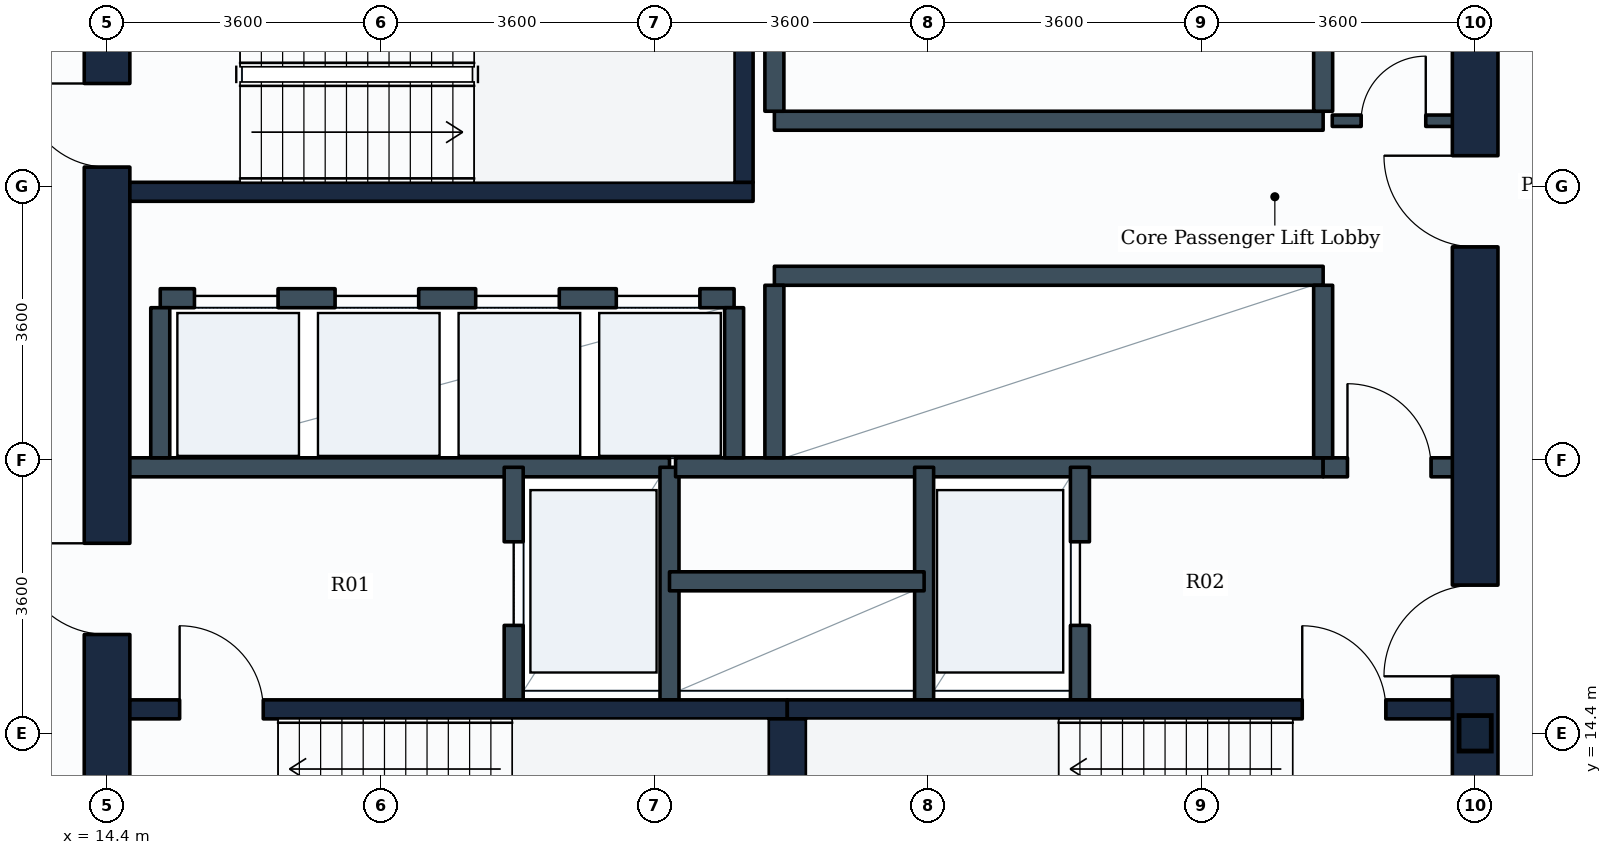
"""IFC4 building model, lengths in metres.
Left out: names, types, materials, properties, quantities, classifications, styles, units other than length and angle.
Written with IfcOpenShell. Run it as: python <this file> out.ifc"""

import sys

from ifc_helpers import new_model, si_unit, direction, frame, frame_2d, origin, origin_2d, place, context, subcontext, project, spatial, rectangle, i_section, extrude, element, fill, save


model = new_model("IFC4")
c1 = context("Model", 3, precision=1e-05, world=origin(), true_north=direction((0.0, 1.0)))
c2 = subcontext(c1, "Body", "Model", "MODEL_VIEW")
j1 = project(units=[si_unit("LENGTHUNIT", "METRE"), si_unit("PLANEANGLEUNIT", "RADIAN")], contexts=[c1])
p1 = place(None, origin())
s1 = spatial("IfcSite", under=j1, at=p1, CompositionType="ELEMENT")
p2 = place(p1, origin())
s2 = spatial("IfcBuilding", under=s1, at=p2, CompositionType="ELEMENT")
p3 = place(p2, frame((0.0, 0.0, 59.1)))
s3 = spatial("IfcBuildingStorey", under=s2, at=p3, CompositionType="ELEMENT", Elevation=59.1)
p4 = place(p3, frame((32.4, 14.4, 0.0), z_axis=(0.0, 0.0, 1.0), x_axis=(1.0, 0.0, 0.0)))
e1 = element("IfcColumn", 1, at=p4, inside=s3, PredefinedType="COLUMN", context=c2, shape_type="SweptSolid", body=[
    extrude(i_section(OverallWidth=0.424, OverallDepth=0.467, WebThickness=0.033, FlangeThickness=0.053, FilletRadius=0.015, at=origin_2d()), origin(), (0.0, 0.0, 1.0), 3.9),
])
p5 = place(p3, frame((14.4, 10.8, 0.0), z_axis=(0.0, 0.0, 1.0), x_axis=(0.0, 1.0, 0.0)))
e2 = element("IfcWall", 2, at=p5, inside=s3, PredefinedType="SHEAR", context=c2, shape_type="SweptSolid", body=[
    extrude(rectangle(XDim=14.4, YDim=0.6, at=frame_2d((7.2, 0.0))), origin(), (0.0, 0.0, 1.0), 3.65),
])
p6 = place(p5, frame((11.05, 0.0, 0.0)))
e3 = element("IfcOpeningElement", 3, at=p6, cuts=e2, PredefinedType="OPENING", context=c2, shape_type="SweptSolid", body=[
    extrude(rectangle(XDim=1.1, YDim=2.1, at=frame_2d((0.55, 1.05))), frame((0.0, 0.31, 0.0), z_axis=(0.0, -1.0, 0.0), x_axis=(1.0, 0.0, 0.0)), (0.0, 0.0, 1.0), 0.62),
])
p7 = place(p5, frame((4.9, 0.0, 0.0)))
e4 = element("IfcOpeningElement", 4, at=p7, cuts=e2, PredefinedType="OPENING", context=c2, shape_type="SweptSolid", body=[
    extrude(rectangle(XDim=1.2, YDim=2.1, at=frame_2d((0.6, 1.05))), frame((0.0, 0.31, 0.0), z_axis=(0.0, -1.0, 0.0), x_axis=(1.0, 0.0, 0.0)), (0.0, 0.0, 1.0), 0.62),
])
p8 = place(p3, frame((32.4, 10.8, 0.0), z_axis=(0.0, 0.0, 1.0), x_axis=(0.0, 1.0, 0.0)))
e5 = element("IfcWall", 5, at=p8, inside=s3, PredefinedType="SHEAR", context=c2, shape_type="SweptSolid", body=[
    extrude(rectangle(XDim=14.4, YDim=0.6, at=frame_2d((7.2, 0.0))), origin(), (0.0, 0.0, 1.0), 3.65),
])
p9 = place(p8, frame((4.35, 0.0, 0.0)))
e6 = element("IfcOpeningElement", 6, at=p9, cuts=e5, PredefinedType="OPENING", context=c2, shape_type="SweptSolid", body=[
    extrude(rectangle(XDim=1.2, YDim=2.1, at=frame_2d((0.6, 1.05))), frame((0.0, 0.31, 0.0), z_axis=(0.0, -1.0, 0.0), x_axis=(1.0, 0.0, 0.0)), (0.0, 0.0, 1.0), 0.62),
])
p10 = place(p8, frame((10.0, 0.0, 0.0)))
e7 = element("IfcOpeningElement", 7, at=p10, cuts=e5, PredefinedType="OPENING", context=c2, shape_type="SweptSolid", body=[
    extrude(rectangle(XDim=1.2, YDim=2.1, at=frame_2d((0.6, 1.05))), frame((0.0, 0.31, 0.0), z_axis=(0.0, -1.0, 0.0), x_axis=(1.0, 0.0, 0.0)), (0.0, 0.0, 1.0), 0.62),
])
p11 = place(p3, frame((14.7, 14.715, 0.0), z_axis=(0.0, 0.0, 1.0), x_axis=(1.0, 0.0, 0.0)))
e8 = element("IfcWall", 8, at=p11, inside=s3, PredefinedType="SHEAR", context=c2, shape_type="SweptSolid", body=[
    extrude(rectangle(XDim=8.65, YDim=0.25, at=frame_2d((4.325, 0.0))), origin(), (0.0, 0.0, 1.0), 3.65),
])
p12 = place(p11, frame((0.655, 0.0, 0.0)))
e9 = element("IfcOpeningElement", 9, at=p12, cuts=e8, PredefinedType="OPENING", context=c2, shape_type="SweptSolid", body=[
    extrude(rectangle(XDim=1.1, YDim=2.1, at=frame_2d((0.55, 1.05))), frame((0.0, 0.135, 0.0), z_axis=(0.0, -1.0, 0.0), x_axis=(1.0, 0.0, 0.0)), (0.0, 0.0, 1.0), 0.27),
])
p13 = place(p3, frame((23.35, 14.715, 0.0), z_axis=(0.0, 0.0, 1.0), x_axis=(1.0, 0.0, 0.0)))
e10 = element("IfcWall", 10, at=p13, inside=s3, PredefinedType="SHEAR", context=c2, shape_type="SweptSolid", body=[
    extrude(rectangle(XDim=8.75, YDim=0.25, at=frame_2d((4.375, 0.0))), origin(), (0.0, 0.0, 1.0), 3.65),
])
p14 = place(p13, frame((6.775, 0.0, 0.0)))
e11 = element("IfcOpeningElement", 11, at=p14, cuts=e10, PredefinedType="OPENING", context=c2, shape_type="SweptSolid", body=[
    extrude(rectangle(XDim=1.1, YDim=2.1, at=frame_2d((0.55, 1.05))), frame((0.0, 0.135, 0.0), z_axis=(0.0, -1.0, 0.0), x_axis=(1.0, 0.0, 0.0)), (0.0, 0.0, 1.0), 0.27),
])
p15 = place(p3, frame((23.35, 11.75, 0.0), z_axis=(0.0, 0.0, 1.0), x_axis=(0.0, 1.0, 0.0)))
e12 = element("IfcWall", 12, at=p15, inside=s3, PredefinedType="SHEAR", context=c2, shape_type="SweptSolid", body=[
    extrude(rectangle(XDim=2.84, YDim=0.5, at=frame_2d((1.42, 0.0))), origin(), (0.0, 0.0, 1.0), 3.65),
])
p16 = place(p3, frame((14.7, 21.525, 0.0), z_axis=(0.0, 0.0, 1.0), x_axis=(1.0, 0.0, 0.0)))
e13 = element("IfcWall", 13, at=p16, inside=s3, PredefinedType="SHEAR", context=c2, shape_type="SweptSolid", body=[
    extrude(rectangle(XDim=8.2, YDim=0.25, at=frame_2d((4.1, 0.0))), origin(), (0.0, 0.0, 1.0), 3.65),
])
p17 = place(p3, frame((22.775, 21.65, 0.0), z_axis=(0.0, 0.0, 1.0), x_axis=(0.0, 1.0, 0.0)))
e14 = element("IfcWall", 14, at=p17, inside=s3, PredefinedType="SHEAR", context=c2, shape_type="SweptSolid", body=[
    extrude(rectangle(XDim=2.84, YDim=0.25, at=frame_2d((1.42, 0.0))), origin(), (0.0, 0.0, 1.0), 3.65),
])
p18 = place(p3, frame((14.65, 17.9, 0.0), z_axis=(0.0, 0.0, 1.0), x_axis=(1.0, 0.0, 0.0)))
e15 = element("IfcWall", 15, at=p18, inside=s3, PredefinedType="PARTITIONING", context=c2, shape_type="SweptSolid", body=[
    extrude(rectangle(XDim=7.15, YDim=0.25, at=frame_2d((3.575, 0.0))), origin(), (0.0, 0.0, 1.0), 3.635),
])
p19 = place(p3, frame((19.75, 14.84, 0.0), z_axis=(0.0, 0.0, 1.0), x_axis=(0.0, 1.0, 0.0)))
e16 = element("IfcWall", 16, at=p19, inside=s3, PredefinedType="PARTITIONING", context=c2, shape_type="SweptSolid", body=[
    extrude(rectangle(XDim=3.06, YDim=0.25, at=frame_2d((1.53, 0.0))), origin(), (0.0, 0.0, 1.0), 3.635),
])
p20 = place(p19, frame((0.98, 0.0, 0.0)))
e17 = element("IfcOpeningElement", 17, at=p20, cuts=e16, PredefinedType="OPENING", context=c2, shape_type="SweptSolid", body=[
    extrude(rectangle(XDim=1.1, YDim=2.1, at=frame_2d((0.55, 1.05))), frame((0.0, 0.135, 0.0), z_axis=(0.0, -1.0, 0.0), x_axis=(1.0, 0.0, 0.0)), (0.0, 0.0, 1.0), 0.27),
])
p21 = place(p3, frame((21.8, 14.84, 0.0), z_axis=(0.0, 0.0, 1.0), x_axis=(0.0, 1.0, 0.0)))
e18 = element("IfcWall", 18, at=p21, inside=s3, PredefinedType="PARTITIONING", context=c2, shape_type="SweptSolid", body=[
    extrude(rectangle(XDim=3.06, YDim=0.25, at=frame_2d((1.53, 0.0))), origin(), (0.0, 0.0, 1.0), 3.635),
])
p22 = place(p3, frame((21.88, 17.9, 0.0), z_axis=(0.0, 0.0, 1.0), x_axis=(1.0, 0.0, 0.0)))
e19 = element("IfcWall", 19, at=p22, inside=s3, PredefinedType="PARTITIONING", context=c2, shape_type="SweptSolid", body=[
    extrude(rectangle(XDim=8.52, YDim=0.25, at=frame_2d((4.26, 0.0))), origin(), (0.0, 0.0, 1.0), 3.635),
])
p23 = place(p3, frame((30.4, 17.9, 0.0), z_axis=(0.0, 0.0, 1.0), x_axis=(1.0, 0.0, 0.0)))
e20 = element("IfcWall", 20, at=p23, inside=s3, PredefinedType="PARTITIONING", context=c2, shape_type="SweptSolid", body=[
    extrude(rectangle(XDim=1.75, YDim=0.25, at=frame_2d((0.875, 0.0))), origin(), (0.0, 0.0, 1.0), 3.635),
])
p24 = place(p23, frame((0.32, 0.0, 0.0)))
e21 = element("IfcOpeningElement", 21, at=p24, cuts=e20, PredefinedType="OPENING", context=c2, shape_type="SweptSolid", body=[
    extrude(rectangle(XDim=1.1, YDim=2.1, at=frame_2d((0.55, 1.05))), frame((0.0, 0.135, 0.0), z_axis=(0.0, -1.0, 0.0), x_axis=(1.0, 0.0, 0.0)), (0.0, 0.0, 1.0), 0.27),
])
p25 = place(p3, frame((25.15, 14.84, 0.0), z_axis=(0.0, 0.0, 1.0), x_axis=(0.0, 1.0, 0.0)))
e22 = element("IfcWall", 22, at=p25, inside=s3, PredefinedType="PARTITIONING", context=c2, shape_type="SweptSolid", body=[
    extrude(rectangle(XDim=3.06, YDim=0.25, at=frame_2d((1.53, 0.0))), origin(), (0.0, 0.0, 1.0), 3.635),
])
p26 = place(p3, frame((27.2, 14.84, 0.0), z_axis=(0.0, 0.0, 1.0), x_axis=(0.0, 1.0, 0.0)))
e23 = element("IfcWall", 23, at=p26, inside=s3, PredefinedType="PARTITIONING", context=c2, shape_type="SweptSolid", body=[
    extrude(rectangle(XDim=3.06, YDim=0.25, at=frame_2d((1.53, 0.0))), origin(), (0.0, 0.0, 1.0), 3.635),
])
p27 = place(p26, frame((0.98, 0.0, 0.0)))
e24 = element("IfcOpeningElement", 24, at=p27, cuts=e23, PredefinedType="OPENING", context=c2, shape_type="SweptSolid", body=[
    extrude(rectangle(XDim=1.1, YDim=2.1, at=frame_2d((0.55, 1.05))), frame((0.0, 0.135, 0.0), z_axis=(0.0, -1.0, 0.0), x_axis=(1.0, 0.0, 0.0)), (0.0, 0.0, 1.0), 0.27),
])
p28 = place(p3, frame((21.8, 16.4, 0.0), z_axis=(0.0, 0.0, 1.0), x_axis=(1.0, 0.0, 0.0)))
e25 = element("IfcWall", 25, at=p28, inside=s3, PredefinedType="PARTITIONING", context=c2, shape_type="SweptSolid", body=[
    extrude(rectangle(XDim=3.35, YDim=0.25, at=frame_2d((1.675, 0.0))), origin(), (0.0, 0.0, 1.0), 3.635),
])
p29 = place(p3, frame((15.1, 20.125, 0.0), z_axis=(0.0, 0.0, 1.0), x_axis=(1.0, 0.0, 0.0)))
e26 = element("IfcWall", 26, at=p29, inside=s3, PredefinedType="PARTITIONING", context=c2, shape_type="SweptSolid", body=[
    extrude(rectangle(XDim=7.55, YDim=0.25, at=frame_2d((3.775, 0.0))), origin(), (0.0, 0.0, 1.0), 3.635),
])
p30 = place(p29, frame((0.45, 0.0, 0.0)))
e27 = element("IfcOpeningElement", 27, at=p30, cuts=e26, PredefinedType="OPENING", context=c2, shape_type="SweptSolid", body=[
    extrude(rectangle(XDim=1.1, YDim=2.1, at=frame_2d((0.55, 1.05))), frame((0.0, 0.135, 0.0), z_axis=(0.0, -1.0, 0.0), x_axis=(1.0, 0.0, 0.0)), (0.0, 0.0, 1.0), 0.27),
])
p31 = place(p29, frame((2.3, 0.0, 0.0)))
e28 = element("IfcOpeningElement", 28, at=p31, cuts=e26, PredefinedType="OPENING", context=c2, shape_type="SweptSolid", body=[
    extrude(rectangle(XDim=1.1, YDim=2.1, at=frame_2d((0.55, 1.05))), frame((0.0, 0.135, 0.0), z_axis=(0.0, -1.0, 0.0), x_axis=(1.0, 0.0, 0.0)), (0.0, 0.0, 1.0), 0.27),
])
p32 = place(p29, frame((4.15, 0.0, 0.0)))
e29 = element("IfcOpeningElement", 29, at=p32, cuts=e26, PredefinedType="OPENING", context=c2, shape_type="SweptSolid", body=[
    extrude(rectangle(XDim=1.1, YDim=2.1, at=frame_2d((0.55, 1.05))), frame((0.0, 0.135, 0.0), z_axis=(0.0, -1.0, 0.0), x_axis=(1.0, 0.0, 0.0)), (0.0, 0.0, 1.0), 0.27),
])
p33 = place(p29, frame((6.0, 0.0, 0.0)))
e30 = element("IfcOpeningElement", 30, at=p33, cuts=e26, PredefinedType="OPENING", context=c2, shape_type="SweptSolid", body=[
    extrude(rectangle(XDim=1.1, YDim=2.1, at=frame_2d((0.55, 1.05))), frame((0.0, 0.135, 0.0), z_axis=(0.0, -1.0, 0.0), x_axis=(1.0, 0.0, 0.0)), (0.0, 0.0, 1.0), 0.27),
])
for number, where, z_axis, x_axis in (
    (31, (15.1, 18.025, 0.0), (0.0, 0.0, 1.0), (0.0, 1.0, 0.0)),
    (32, (22.65, 18.025, 0.0), (0.0, 0.0, 1.0), (0.0, 1.0, 0.0)),
):
    element("IfcWall", number, at=place(p3, frame(where, z_axis=z_axis, x_axis=x_axis)), inside=s3, PredefinedType="PARTITIONING", context=c2, shape_type="SweptSolid", body=[
        extrude(rectangle(XDim=1.975, YDim=0.25, at=frame_2d((0.988, 0.0))), origin(), (0.0, 0.0, 1.0), 3.635),
    ])
p34 = place(p3, frame((23.18, 20.42, 0.0), z_axis=(0.0, 0.0, 1.0), x_axis=(1.0, 0.0, 0.0)))
e33 = element("IfcWall", 33, at=p34, inside=s3, PredefinedType="PARTITIONING", context=c2, shape_type="SweptSolid", body=[
    extrude(rectangle(XDim=7.22, YDim=0.25, at=frame_2d((3.61, 0.0))), origin(), (0.0, 0.0, 1.0), 3.635),
])
for number, where, z_axis, x_axis in (
    (34, (23.18, 18.025, 0.0), (0.0, 0.0, 1.0), (0.0, 1.0, 0.0)),
    (35, (30.4, 18.025, 0.0), (0.0, 0.0, 1.0), (0.0, 1.0, 0.0)),
):
    element("IfcWall", number, at=place(p3, frame(where, z_axis=z_axis, x_axis=x_axis)), inside=s3, PredefinedType="PARTITIONING", context=c2, shape_type="SweptSolid", body=[
        extrude(rectangle(XDim=2.27, YDim=0.25, at=frame_2d((1.135, 0.0))), origin(), (0.0, 0.0, 1.0), 3.635),
    ])
p35 = place(p3, frame((23.18, 22.46, 0.0), z_axis=(0.0, 0.0, 1.0), x_axis=(1.0, 0.0, 0.0)))
e36 = element("IfcWall", 36, at=p35, inside=s3, PredefinedType="PARTITIONING", context=c2, shape_type="SweptSolid", body=[
    extrude(rectangle(XDim=7.22, YDim=0.25, at=frame_2d((3.61, 0.0))), origin(), (0.0, 0.0, 1.0), 3.635),
])
for number, where, z_axis, x_axis in (
    (37, (23.18, 22.585, 0.0), (0.0, 0.0, 1.0), (0.0, 1.0, 0.0)),
    (38, (30.4, 22.585, 0.0), (0.0, 0.0, 1.0), (0.0, 1.0, 0.0)),
):
    element("IfcWall", number, at=place(p3, frame(where, z_axis=z_axis, x_axis=x_axis)), inside=s3, PredefinedType="PARTITIONING", context=c2, shape_type="SweptSolid", body=[
        extrude(rectangle(XDim=2.315, YDim=0.25, at=frame_2d((1.157, 0.0))), origin(), (0.0, 0.0, 1.0), 3.635),
    ])
p36 = place(p3, frame((30.52, 22.46, 0.0), z_axis=(0.0, 0.0, 1.0), x_axis=(1.0, 0.0, 0.0)))
e39 = element("IfcWall", 39, at=p36, inside=s3, PredefinedType="PARTITIONING", context=c2, shape_type="SweptSolid", body=[
    extrude(rectangle(XDim=1.63, YDim=0.15, at=frame_2d((0.815, 0.0))), origin(), (0.0, 0.0, 1.0), 3.635),
])
p37 = place(p36, frame((0.38, 0.0, 0.0)))
e40 = element("IfcOpeningElement", 40, at=p37, cuts=e39, PredefinedType="OPENING", context=c2, shape_type="SweptSolid", body=[
    extrude(rectangle(XDim=0.85, YDim=2.1, at=frame_2d((0.425, 1.05))), frame((0.0, 0.085, 0.0), z_axis=(0.0, -1.0, 0.0), x_axis=(1.0, 0.0, 0.0)), (0.0, 0.0, 1.0), 0.17),
])
p38 = place(p12, origin())
e41 = element("IfcDoor", 41, at=p38, inside=s3, OperationType="SINGLE_SWING_LEFT", PredefinedType="DOOR", context=c2, shape_type="SweptSolid", body=[
    extrude(rectangle(XDim=1.1, YDim=2.1, at=frame_2d((0.55, 1.05))), frame((0.0, 0.025, 0.0), z_axis=(0.0, -1.0, 0.0), x_axis=(1.0, 0.0, 0.0)), (0.0, 0.0, 1.0), 0.05),
])
fill(e9, e41)
p39 = place(p14, origin())
e42 = element("IfcDoor", 42, at=p39, inside=s3, OperationType="SINGLE_SWING_LEFT", PredefinedType="DOOR", context=c2, shape_type="SweptSolid", body=[
    extrude(rectangle(XDim=1.1, YDim=2.1, at=frame_2d((0.55, 1.05))), frame((0.0, 0.025, 0.0), z_axis=(0.0, -1.0, 0.0), x_axis=(1.0, 0.0, 0.0)), (0.0, 0.0, 1.0), 0.05),
])
fill(e11, e42)
p40 = place(p6, origin())
e43 = element("IfcDoor", 43, at=p40, inside=s3, OperationType="SINGLE_SWING_RIGHT", PredefinedType="DOOR", context=c2, shape_type="SweptSolid", body=[
    extrude(rectangle(XDim=1.1, YDim=2.1, at=frame_2d((0.55, 1.05))), frame((0.0, 0.025, 0.0), z_axis=(0.0, -1.0, 0.0), x_axis=(1.0, 0.0, 0.0)), (0.0, 0.0, 1.0), 0.05),
])
fill(e3, e43)
p41 = place(p20, origin())
e44 = element("IfcDoor", 44, at=p41, inside=s3, OperationType="SLIDING_TO_LEFT", PredefinedType="DOOR", context=c2, shape_type="SweptSolid", body=[
    extrude(rectangle(XDim=1.1, YDim=2.1, at=frame_2d((0.55, 1.05))), frame((0.0, 0.025, 0.0), z_axis=(0.0, -1.0, 0.0), x_axis=(1.0, 0.0, 0.0)), (0.0, 0.0, 1.0), 0.05),
])
fill(e17, e44)
p42 = place(p27, origin())
e45 = element("IfcDoor", 45, at=p42, inside=s3, OperationType="SLIDING_TO_LEFT", PredefinedType="DOOR", context=c2, shape_type="SweptSolid", body=[
    extrude(rectangle(XDim=1.1, YDim=2.1, at=frame_2d((0.55, 1.05))), frame((0.0, 0.025, 0.0), z_axis=(0.0, -1.0, 0.0), x_axis=(1.0, 0.0, 0.0)), (0.0, 0.0, 1.0), 0.05),
])
fill(e24, e45)
p43 = place(p7, origin())
e46 = element("IfcDoor", 46, at=p43, inside=s3, OperationType="SINGLE_SWING_RIGHT", PredefinedType="DOOR", context=c2, shape_type="SweptSolid", body=[
    extrude(rectangle(XDim=1.2, YDim=2.1, at=frame_2d((0.6, 1.05))), frame((0.0, 0.025, 0.0), z_axis=(0.0, -1.0, 0.0), x_axis=(1.0, 0.0, 0.0)), (0.0, 0.0, 1.0), 0.05),
])
fill(e4, e46)
p44 = place(p9, origin())
e47 = element("IfcDoor", 47, at=p44, inside=s3, OperationType="SINGLE_SWING_LEFT", PredefinedType="DOOR", context=c2, shape_type="SweptSolid", body=[
    extrude(rectangle(XDim=1.2, YDim=2.1, at=frame_2d((0.6, 1.05))), frame((0.0, 0.025, 0.0), z_axis=(0.0, -1.0, 0.0), x_axis=(1.0, 0.0, 0.0)), (0.0, 0.0, 1.0), 0.05),
])
fill(e6, e47)
p45 = place(p24, origin())
e48 = element("IfcDoor", 48, at=p45, inside=s3, OperationType="SINGLE_SWING_LEFT", PredefinedType="DOOR", context=c2, shape_type="SweptSolid", body=[
    extrude(rectangle(XDim=1.1, YDim=2.1, at=frame_2d((0.55, 1.05))), frame((0.0, 0.025, 0.0), z_axis=(0.0, -1.0, 0.0), x_axis=(1.0, 0.0, 0.0)), (0.0, 0.0, 1.0), 0.05),
])
fill(e21, e48)
p46 = place(p30, origin())
e49 = element("IfcDoor", 49, at=p46, inside=s3, OperationType="SLIDING_TO_LEFT", PredefinedType="DOOR", context=c2, shape_type="SweptSolid", body=[
    extrude(rectangle(XDim=1.1, YDim=2.1, at=frame_2d((0.55, 1.05))), frame((0.0, 0.025, 0.0), z_axis=(0.0, -1.0, 0.0), x_axis=(1.0, 0.0, 0.0)), (0.0, 0.0, 1.0), 0.05),
])
fill(e27, e49)
p47 = place(p31, origin())
e50 = element("IfcDoor", 50, at=p47, inside=s3, OperationType="SLIDING_TO_LEFT", PredefinedType="DOOR", context=c2, shape_type="SweptSolid", body=[
    extrude(rectangle(XDim=1.1, YDim=2.1, at=frame_2d((0.55, 1.05))), frame((0.0, 0.025, 0.0), z_axis=(0.0, -1.0, 0.0), x_axis=(1.0, 0.0, 0.0)), (0.0, 0.0, 1.0), 0.05),
])
fill(e28, e50)
p48 = place(p32, origin())
e51 = element("IfcDoor", 51, at=p48, inside=s3, OperationType="SLIDING_TO_LEFT", PredefinedType="DOOR", context=c2, shape_type="SweptSolid", body=[
    extrude(rectangle(XDim=1.1, YDim=2.1, at=frame_2d((0.55, 1.05))), frame((0.0, 0.025, 0.0), z_axis=(0.0, -1.0, 0.0), x_axis=(1.0, 0.0, 0.0)), (0.0, 0.0, 1.0), 0.05),
])
fill(e29, e51)
p49 = place(p33, origin())
e52 = element("IfcDoor", 52, at=p49, inside=s3, OperationType="SLIDING_TO_LEFT", PredefinedType="DOOR", context=c2, shape_type="SweptSolid", body=[
    extrude(rectangle(XDim=1.1, YDim=2.1, at=frame_2d((0.55, 1.05))), frame((0.0, 0.025, 0.0), z_axis=(0.0, -1.0, 0.0), x_axis=(1.0, 0.0, 0.0)), (0.0, 0.0, 1.0), 0.05),
])
fill(e30, e52)
p50 = place(p10, origin())
e53 = element("IfcDoor", 53, at=p50, inside=s3, OperationType="SINGLE_SWING_RIGHT", PredefinedType="DOOR", context=c2, shape_type="SweptSolid", body=[
    extrude(rectangle(XDim=1.2, YDim=2.1, at=frame_2d((0.6, 1.05))), frame((0.0, 0.025, 0.0), z_axis=(0.0, -1.0, 0.0), x_axis=(1.0, 0.0, 0.0)), (0.0, 0.0, 1.0), 0.05),
])
fill(e7, e53)
p51 = place(p37, origin())
e54 = element("IfcDoor", 54, at=p51, inside=s3, OperationType="SINGLE_SWING_RIGHT", PredefinedType="DOOR", context=c2, shape_type="SweptSolid", body=[
    extrude(rectangle(XDim=0.85, YDim=2.1, at=frame_2d((0.425, 1.05))), frame((0.0, 0.025, 0.0), z_axis=(0.0, -1.0, 0.0), x_axis=(1.0, 0.0, 0.0)), (0.0, 0.0, 1.0), 0.05),
])
fill(e40, e54)
save(model, sys.argv[1])
